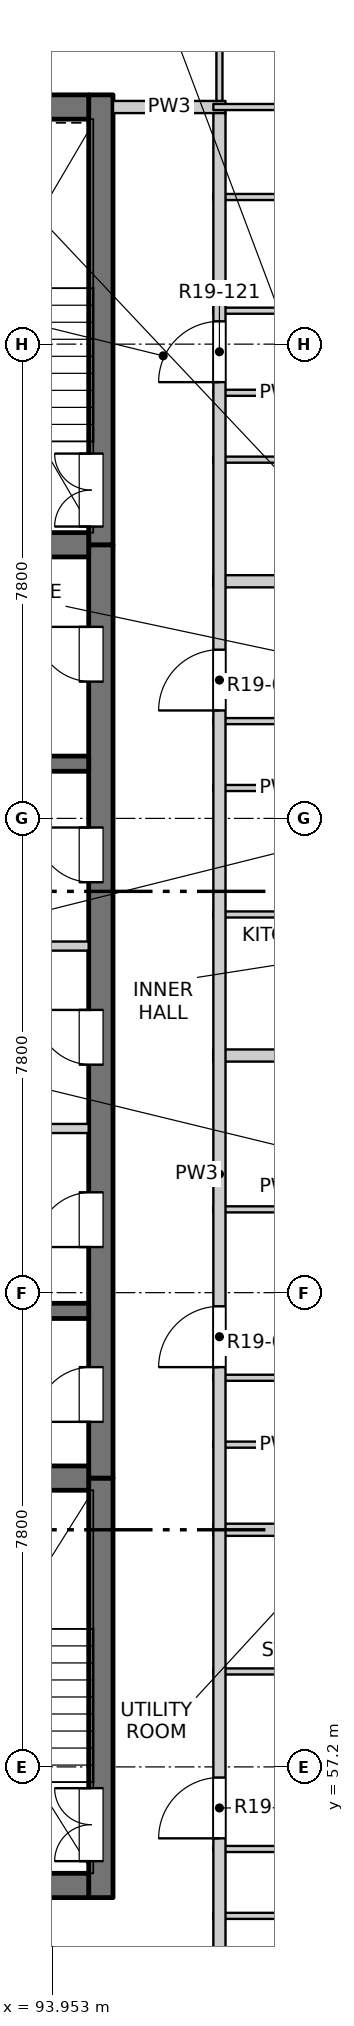
"""IFC4 building model, lengths in metres.
Left out: names, types, materials, properties, quantities, classifications, styles, units other than length and angle.
Written with IfcOpenShell. Run it as: python <this file> out.ifc"""

import sys

from ifc_helpers import new_model, si_unit, direction, frame, frame_2d, origin, place, context, subcontext, project, spatial, rectangle, extrude, element, fill, save


model = new_model("IFC4")
c1 = context("Model", 3, precision=1e-05, world=origin(), true_north=direction((0.0, 1.0)))
c2 = subcontext(c1, "Body", "Model", "MODEL_VIEW")
j1 = project(units=[si_unit("LENGTHUNIT", "METRE"), si_unit("PLANEANGLEUNIT", "RADIAN")], contexts=[c1])
p1 = place(None, origin())
s1 = spatial("IfcSite", under=j1, at=p1, CompositionType="ELEMENT")
p2 = place(p1, origin())
s2 = spatial("IfcBuilding", under=s1, at=p2, CompositionType="ELEMENT")
p3 = place(p2, frame((0.0, 0.0, 197.3)))
s3 = spatial("IfcBuildingStorey", under=s2, at=p3, CompositionType="ELEMENT", Elevation=197.3)
p4 = place(p3, frame((94.75, 55.05, -0.3), z_axis=(0.0, 0.0, 1.0), x_axis=(0.0, 1.0, 0.0)))
e1 = element("IfcWall", 1, at=p4, inside=s3, PredefinedType="SOLIDWALL", context=c2, shape_type="SweptSolid", body=[
    extrude(rectangle(XDim=6.9, YDim=0.4, at=frame_2d((3.45, 0.0))), origin(), (0.0, 0.0, 1.0), 3.45),
])
p5 = place(p4, frame((0.6, 0.0, 0.3)))
e2 = element("IfcOpeningElement", 2, at=p5, cuts=e1, PredefinedType="OPENING", context=c2, shape_type="SweptSolid", body=[
    extrude(rectangle(XDim=1.2, YDim=2.1, at=frame_2d((0.6, 1.05))), frame((0.0, 0.21, 0.0), z_axis=(0.0, -1.0, 0.0), x_axis=(1.0, 0.0, 0.0)), (0.0, 0.0, 1.0), 0.42),
])
p6 = place(p3, frame((94.75, 61.95, -0.3), z_axis=(0.0, 0.0, 1.0), x_axis=(0.0, 1.0, 0.0)))
e3 = element("IfcWall", 3, at=p6, inside=s3, PredefinedType="SOLIDWALL", context=c2, shape_type="SweptSolid", body=[
    extrude(rectangle(XDim=15.35, YDim=0.4, at=frame_2d((7.675, 0.0))), origin(), (0.0, 0.0, 1.0), 3.45),
])
p7 = place(p6, frame((0.925, 0.0, 0.3)))
e4 = element("IfcOpeningElement", 4, at=p7, cuts=e3, PredefinedType="OPENING", context=c2, shape_type="SweptSolid", body=[
    extrude(rectangle(XDim=0.9, YDim=2.1, at=frame_2d((0.45, 1.05))), frame((0.0, 0.21, 0.0), z_axis=(0.0, -1.0, 0.0), x_axis=(1.0, 0.0, 0.0)), (0.0, 0.0, 1.0), 0.42),
])
p8 = place(p6, frame((3.8, 0.0, 0.3)))
e5 = element("IfcOpeningElement", 5, at=p8, cuts=e3, PredefinedType="OPENING", context=c2, shape_type="SweptSolid", body=[
    extrude(rectangle(XDim=0.9, YDim=2.1, at=frame_2d((0.45, 1.05))), frame((0.0, 0.21, 0.0), z_axis=(0.0, -1.0, 0.0), x_axis=(1.0, 0.0, 0.0)), (0.0, 0.0, 1.0), 0.42),
])
p9 = place(p6, frame((6.8, 0.0, 0.3)))
e6 = element("IfcOpeningElement", 6, at=p9, cuts=e3, PredefinedType="OPENING", context=c2, shape_type="SweptSolid", body=[
    extrude(rectangle(XDim=0.9, YDim=2.1, at=frame_2d((0.45, 1.05))), frame((0.0, 0.21, 0.0), z_axis=(0.0, -1.0, 0.0), x_axis=(1.0, 0.0, 0.0)), (0.0, 0.0, 1.0), 0.42),
])
p10 = place(p6, frame((9.8, 0.0, 0.3)))
e7 = element("IfcOpeningElement", 7, at=p10, cuts=e3, PredefinedType="OPENING", context=c2, shape_type="SweptSolid", body=[
    extrude(rectangle(XDim=0.9, YDim=2.1, at=frame_2d((0.45, 1.05))), frame((0.0, 0.21, 0.0), z_axis=(0.0, -1.0, 0.0), x_axis=(1.0, 0.0, 0.0)), (0.0, 0.0, 1.0), 0.42),
])
p11 = place(p6, frame((13.1, 0.0, 0.3)))
e8 = element("IfcOpeningElement", 8, at=p11, cuts=e3, PredefinedType="OPENING", context=c2, shape_type="SweptSolid", body=[
    extrude(rectangle(XDim=0.9, YDim=2.1, at=frame_2d((0.45, 1.05))), frame((0.0, 0.21, 0.0), z_axis=(0.0, -1.0, 0.0), x_axis=(1.0, 0.0, 0.0)), (0.0, 0.0, 1.0), 0.42),
])
p12 = place(p3, frame((94.75, 77.3, -0.3), z_axis=(0.0, 0.0, 1.0), x_axis=(0.0, 1.0, 0.0)))
e9 = element("IfcWall", 9, at=p12, inside=s3, PredefinedType="SOLIDWALL", context=c2, shape_type="SweptSolid", body=[
    extrude(rectangle(XDim=7.4, YDim=0.4, at=frame_2d((3.7, 0.0))), origin(), (0.0, 0.0, 1.0), 3.45),
])
p13 = place(p12, frame((0.3, 0.0, 0.3)))
e10 = element("IfcOpeningElement", 10, at=p13, cuts=e9, PredefinedType="OPENING", context=c2, shape_type="SweptSolid", body=[
    extrude(rectangle(XDim=1.2, YDim=2.1, at=frame_2d((0.6, 1.05))), frame((0.0, 0.21, 0.0), z_axis=(0.0, -1.0, 0.0), x_axis=(1.0, 0.0, 0.0)), (0.0, 0.0, 1.0), 0.42),
])
p14 = place(p3, frame((75.45, 55.25, -0.3), z_axis=(0.0, 0.0, 1.0), x_axis=(1.0, 0.0, 0.0)))
e11 = element("IfcWall", 11, at=p14, inside=s3, PredefinedType="SOLIDWALL", context=c2, shape_type="SweptSolid", body=[
    extrude(rectangle(XDim=19.1, YDim=0.4, at=frame_2d((9.55, 0.0))), origin(), (0.0, 0.0, 1.0), 3.45),
])
p15 = place(p14, frame((8.8, 0.0, 0.3)))
e12 = element("IfcOpeningElement", 12, at=p15, cuts=e11, PredefinedType="OPENING", context=c2, shape_type="SweptSolid", body=[
    extrude(rectangle(XDim=1.5, YDim=2.1, at=frame_2d((0.75, 1.05))), frame((0.0, 0.21, 0.0), z_axis=(0.0, -1.0, 0.0), x_axis=(1.0, 0.0, 0.0)), (0.0, 0.0, 1.0), 0.42),
])
p16 = place(p3, frame((75.45, 84.5, -0.3), z_axis=(0.0, 0.0, 1.0), x_axis=(1.0, 0.0, 0.0)))
e13 = element("IfcWall", 13, at=p16, inside=s3, PredefinedType="SOLIDWALL", context=c2, shape_type="SweptSolid", body=[
    extrude(rectangle(XDim=19.1, YDim=0.4, at=frame_2d((9.55, 0.0))), origin(), (0.0, 0.0, 1.0), 3.45),
])
p17 = place(p3, frame((90.675, 61.95, -0.3), z_axis=(0.0, 0.0, 1.0), x_axis=(1.0, 0.0, 0.0)))
e14 = element("IfcWall", 14, at=p17, inside=s3, PredefinedType="SOLIDWALL", context=c2, shape_type="SweptSolid", body=[
    extrude(rectangle(XDim=3.875, YDim=0.4, at=frame_2d((1.938, 0.0))), origin(), (0.0, 0.0, 1.0), 3.45),
])
for number, where, z_axis, x_axis in (
    (15, (90.675, 64.7, -0.3), (0.0, 0.0, 1.0), (1.0, 0.0, 0.0)),
    (16, (90.675, 73.7, -0.3), (0.0, 0.0, 1.0), (1.0, 0.0, 0.0)),
):
    element("IfcWall", number, at=place(p3, frame(where, z_axis=z_axis, x_axis=x_axis)), inside=s3, PredefinedType="SOLIDWALL", context=c2, shape_type="SweptSolid", body=[
        extrude(rectangle(XDim=3.875, YDim=0.25, at=frame_2d((1.938, 0.0))), origin(), (0.0, 0.0, 1.0), 3.45),
    ])
p18 = place(p3, frame((90.675, 77.3, -0.3), z_axis=(0.0, 0.0, 1.0), x_axis=(1.0, 0.0, 0.0)))
e17 = element("IfcWall", 17, at=p18, inside=s3, PredefinedType="SOLIDWALL", context=c2, shape_type="SweptSolid", body=[
    extrude(rectangle(XDim=3.875, YDim=0.4, at=frame_2d((1.938, 0.0))), origin(), (0.0, 0.0, 1.0), 3.45),
])
for number, where, z_axis, x_axis in (
    (18, (96.6, 54.75, 0.0), (0.0, 0.0, 1.0), (1.0, 0.0, 0.0)),
    (19, (96.6, 55.85, 0.0), (0.0, 0.0, 1.0), (1.0, 0.0, 0.0)),
    (20, (96.6, 58.77, 0.0), (0.0, 0.0, 1.0), (1.0, 0.0, 0.0)),
):
    element("IfcWall", number, at=place(p3, frame(where, z_axis=z_axis, x_axis=x_axis)), inside=s3, PredefinedType="PARTITIONING", context=c2, shape_type="SweptSolid", body=[
        extrude(rectangle(XDim=2.22, YDim=0.1, at=frame_2d((1.11, 0.0))), origin(), (0.0, 0.0, 1.0), 3.15),
    ])
p19 = place(p3, frame((96.6, 61.1, 0.0), z_axis=(0.0, 0.0, 1.0), x_axis=(1.0, 0.0, 0.0)))
e21 = element("IfcWall", 21, at=p19, inside=s3, PredefinedType="PARTITIONING", context=c2, shape_type="SweptSolid", body=[
    extrude(rectangle(XDim=11.5, YDim=0.2, at=frame_2d((5.75, 0.0))), origin(), (0.0, 0.0, 1.0), 2.55),
])
for number, where, z_axis, x_axis in (
    (22, (96.6, 62.5, 0.0), (0.0, 0.0, 1.0), (1.0, 0.0, 0.0)),
    (23, (96.6, 63.6, 0.0), (0.0, 0.0, 1.0), (1.0, 0.0, 0.0)),
    (24, (96.6, 66.37, 0.0), (0.0, 0.0, 1.0), (1.0, 0.0, 0.0)),
):
    element("IfcWall", number, at=place(p3, frame(where, z_axis=z_axis, x_axis=x_axis)), inside=s3, PredefinedType="PARTITIONING", context=c2, shape_type="SweptSolid", body=[
        extrude(rectangle(XDim=2.22, YDim=0.1, at=frame_2d((1.11, 0.0))), origin(), (0.0, 0.0, 1.0), 3.15),
    ])
p20 = place(p3, frame((90.675, 67.7, 0.0), z_axis=(0.0, 0.0, 1.0), x_axis=(1.0, 0.0, 0.0)))
e25 = element("IfcWall", 25, at=p20, inside=s3, PredefinedType="PARTITIONING", context=c2, shape_type="SweptSolid", body=[
    extrude(rectangle(XDim=3.875, YDim=0.15, at=frame_2d((1.938, 0.0))), origin(), (0.0, 0.0, 1.0), 3.15),
])
p21 = place(p3, frame((96.6, 68.9, 0.0), z_axis=(0.0, 0.0, 1.0), x_axis=(1.0, 0.0, 0.0)))
e26 = element("IfcWall", 26, at=p21, inside=s3, PredefinedType="PARTITIONING", context=c2, shape_type="SweptSolid", body=[
    extrude(rectangle(XDim=11.5, YDim=0.2, at=frame_2d((5.75, 0.0))), origin(), (0.0, 0.0, 1.0), 2.55),
])
p22 = place(p3, frame((90.675, 70.7, 0.0), z_axis=(0.0, 0.0, 1.0), x_axis=(1.0, 0.0, 0.0)))
e27 = element("IfcWall", 27, at=p22, inside=s3, PredefinedType="PARTITIONING", context=c2, shape_type="SweptSolid", body=[
    extrude(rectangle(XDim=3.875, YDim=0.15, at=frame_2d((1.938, 0.0))), origin(), (0.0, 0.0, 1.0), 3.15),
])
for number, where, z_axis, x_axis in (
    (28, (96.6, 71.22, 0.0), (0.0, 0.0, 1.0), (1.0, 0.0, 0.0)),
    (29, (96.6, 73.3, 0.0), (0.0, 0.0, 1.0), (1.0, 0.0, 0.0)),
    (30, (96.6, 74.4, 0.0), (0.0, 0.0, 1.0), (1.0, 0.0, 0.0)),
):
    element("IfcWall", number, at=place(p3, frame(where, z_axis=z_axis, x_axis=x_axis)), inside=s3, PredefinedType="PARTITIONING", context=c2, shape_type="SweptSolid", body=[
        extrude(rectangle(XDim=2.22, YDim=0.1, at=frame_2d((1.11, 0.0))), origin(), (0.0, 0.0, 1.0), 3.15),
    ])
p23 = place(p3, frame((96.6, 76.7, 0.0), z_axis=(0.0, 0.0, 1.0), x_axis=(1.0, 0.0, 0.0)))
e31 = element("IfcWall", 31, at=p23, inside=s3, PredefinedType="PARTITIONING", context=c2, shape_type="SweptSolid", body=[
    extrude(rectangle(XDim=11.5, YDim=0.2, at=frame_2d((5.75, 0.0))), origin(), (0.0, 0.0, 1.0), 2.55),
])
for number, where, z_axis, x_axis in (
    (32, (96.6, 78.7, 0.0), (0.0, 0.0, 1.0), (1.0, 0.0, 0.0)),
    (33, (96.6, 79.8, 0.0), (0.0, 0.0, 1.0), (1.0, 0.0, 0.0)),
    (34, (96.6, 81.15, 0.0), (0.0, 0.0, 1.0), (1.0, 0.0, 0.0)),
    (35, (96.6, 83.02, 0.0), (0.0, 0.0, 1.0), (1.0, 0.0, 0.0)),
):
    element("IfcWall", number, at=place(p3, frame(where, z_axis=z_axis, x_axis=x_axis)), inside=s3, PredefinedType="PARTITIONING", context=c2, shape_type="SweptSolid", body=[
        extrude(rectangle(XDim=2.22, YDim=0.1, at=frame_2d((1.11, 0.0))), origin(), (0.0, 0.0, 1.0), 3.15),
    ])
p24 = place(p3, frame((94.95, 84.5, 0.0), z_axis=(0.0, 0.0, 1.0), x_axis=(1.0, 0.0, 0.0)))
e36 = element("IfcWall", 36, at=p24, inside=s3, PredefinedType="PARTITIONING", context=c2, shape_type="SweptSolid", body=[
    extrude(rectangle(XDim=1.85, YDim=0.2, at=frame_2d((0.925, 0.0))), origin(), (0.0, 0.0, 1.0), 3.15),
])
p25 = place(p3, frame((96.6, 84.5, 0.0), z_axis=(0.0, 0.0, 1.0), x_axis=(1.0, 0.0, 0.0)))
e37 = element("IfcWall", 37, at=p25, inside=s3, PredefinedType="PARTITIONING", context=c2, shape_type="SweptSolid", body=[
    extrude(rectangle(XDim=11.5, YDim=0.1, at=frame_2d((5.75, 0.0))), origin(), (0.0, 0.0, 1.0), 3.15),
])
p26 = place(p25, frame((2.635, 0.0, 0.0)))
e38 = element("IfcOpeningElement", 38, at=p26, cuts=e37, PredefinedType="OPENING", context=c2, shape_type="SweptSolid", body=[
    extrude(rectangle(XDim=0.9, YDim=2.1, at=frame_2d((0.45, 1.05))), frame((0.0, 0.06, 0.0), z_axis=(0.0, -1.0, 0.0), x_axis=(1.0, 0.0, 0.0)), (0.0, 0.0, 1.0), 0.12),
])
p27 = place(p3, frame((96.7, 49.5, 0.0), z_axis=(0.0, 0.0, 1.0), x_axis=(0.0, 1.0, 0.0)))
e39 = element("IfcWall", 39, at=p27, inside=s3, PredefinedType="PARTITIONING", context=c2, shape_type="SweptSolid", body=[
    extrude(rectangle(XDim=34.9, YDim=0.2, at=frame_2d((17.45, 0.0))), origin(), (0.0, 0.0, 1.0), 3.15),
])
p28 = place(p27, frame((6.525, 0.0, 0.0)))
e40 = element("IfcOpeningElement", 40, at=p28, cuts=e39, PredefinedType="OPENING", context=c2, shape_type="SweptSolid", body=[
    extrude(rectangle(XDim=1.0, YDim=2.1, at=frame_2d((0.5, 1.05))), frame((0.0, 0.11, 0.0), z_axis=(0.0, -1.0, 0.0), x_axis=(1.0, 0.0, 0.0)), (0.0, 0.0, 1.0), 0.22),
])
p29 = place(p27, frame((14.275, 0.0, 0.0)))
e41 = element("IfcOpeningElement", 41, at=p29, cuts=e39, PredefinedType="OPENING", context=c2, shape_type="SweptSolid", body=[
    extrude(rectangle(XDim=1.0, YDim=2.1, at=frame_2d((0.5, 1.05))), frame((0.0, 0.11, 0.0), z_axis=(0.0, -1.0, 0.0), x_axis=(1.0, 0.0, 0.0)), (0.0, 0.0, 1.0), 0.22),
])
p30 = place(p27, frame((25.075, 0.0, 0.0)))
e42 = element("IfcOpeningElement", 42, at=p30, cuts=e39, PredefinedType="OPENING", context=c2, shape_type="SweptSolid", body=[
    extrude(rectangle(XDim=1.0, YDim=2.1, at=frame_2d((0.5, 1.05))), frame((0.0, 0.11, 0.0), z_axis=(0.0, -1.0, 0.0), x_axis=(1.0, 0.0, 0.0)), (0.0, 0.0, 1.0), 0.22),
])
p31 = place(p27, frame((30.475, 0.0, 0.0)))
e43 = element("IfcOpeningElement", 43, at=p31, cuts=e39, PredefinedType="OPENING", context=c2, shape_type="SweptSolid", body=[
    extrude(rectangle(XDim=1.0, YDim=2.1, at=frame_2d((0.5, 1.05))), frame((0.0, 0.11, 0.0), z_axis=(0.0, -1.0, 0.0), x_axis=(1.0, 0.0, 0.0)), (0.0, 0.0, 1.0), 0.22),
])
p32 = place(p3, frame((96.7, 84.6, 0.0), z_axis=(0.0, 0.0, 1.0), x_axis=(0.0, 1.0, 0.0)))
e44 = element("IfcWall", 44, at=p32, inside=s3, PredefinedType="PARTITIONING", context=c2, shape_type="SweptSolid", body=[
    extrude(rectangle(XDim=3.5, YDim=0.1, at=frame_2d((1.75, 0.0))), origin(), (0.0, 0.0, 1.0), 3.15),
])
p33 = place(p32, frame((1.4, 0.0, 0.0)))
e45 = element("IfcOpeningElement", 45, at=p33, cuts=e44, PredefinedType="OPENING", context=c2, shape_type="SweptSolid", body=[
    extrude(rectangle(XDim=0.9, YDim=2.1, at=frame_2d((0.45, 1.05))), frame((0.0, 0.06, 0.0), z_axis=(0.0, -1.0, 0.0), x_axis=(1.0, 0.0, 0.0)), (0.0, 0.0, 1.0), 0.12),
])
p34 = place(p5, origin())
e46 = element("IfcDoor", 46, at=p34, inside=s3, OperationType="DOUBLE_DOOR_SINGLE_SWING", PredefinedType="DOOR", context=c2, shape_type="SweptSolid", body=[
    extrude(rectangle(XDim=1.2, YDim=2.1, at=frame_2d((0.6, 1.05))), frame((0.0, 0.185, 0.0), z_axis=(0.0, -1.0, 0.0), x_axis=(1.0, 0.0, 0.0)), (0.0, 0.0, 1.0), 0.05),
])
fill(e2, e46)
p35 = place(p28, origin())
e47 = element("IfcDoor", 47, at=p35, inside=s3, OperationType="SINGLE_SWING_LEFT", PredefinedType="DOOR", context=c2, shape_type="SweptSolid", body=[
    extrude(rectangle(XDim=1.0, YDim=2.1, at=frame_2d((0.5, 1.05))), frame((0.0, 0.025, 0.0), z_axis=(0.0, -1.0, 0.0), x_axis=(1.0, 0.0, 0.0)), (0.0, 0.0, 1.0), 0.05),
])
fill(e40, e47)
p36 = place(p7, origin())
e48 = element("IfcDoor", 48, at=p36, inside=s3, OperationType="SINGLE_SWING_LEFT", PredefinedType="DOOR", context=c2, shape_type="SweptSolid", body=[
    extrude(rectangle(XDim=0.9, YDim=2.1, at=frame_2d((0.45, 1.05))), frame((0.0, 0.185, 0.0), z_axis=(0.0, -1.0, 0.0), x_axis=(1.0, 0.0, 0.0)), (0.0, 0.0, 1.0), 0.05),
])
fill(e4, e48)
p37 = place(p29, origin())
e49 = element("IfcDoor", 49, at=p37, inside=s3, OperationType="SINGLE_SWING_LEFT", PredefinedType="DOOR", context=c2, shape_type="SweptSolid", body=[
    extrude(rectangle(XDim=1.0, YDim=2.1, at=frame_2d((0.5, 1.05))), frame((0.0, 0.025, 0.0), z_axis=(0.0, -1.0, 0.0), x_axis=(1.0, 0.0, 0.0)), (0.0, 0.0, 1.0), 0.05),
])
fill(e41, e49)
p38 = place(p8, origin())
e50 = element("IfcDoor", 50, at=p38, inside=s3, OperationType="SINGLE_SWING_LEFT", PredefinedType="DOOR", context=c2, shape_type="SweptSolid", body=[
    extrude(rectangle(XDim=0.9, YDim=2.1, at=frame_2d((0.45, 1.05))), frame((0.0, 0.185, 0.0), z_axis=(0.0, -1.0, 0.0), x_axis=(1.0, 0.0, 0.0)), (0.0, 0.0, 1.0), 0.05),
])
fill(e5, e50)
p39 = place(p9, origin())
e51 = element("IfcDoor", 51, at=p39, inside=s3, OperationType="SINGLE_SWING_RIGHT", PredefinedType="DOOR", context=c2, shape_type="SweptSolid", body=[
    extrude(rectangle(XDim=0.9, YDim=2.1, at=frame_2d((0.45, 1.05))), frame((0.0, 0.185, 0.0), z_axis=(0.0, -1.0, 0.0), x_axis=(1.0, 0.0, 0.0)), (0.0, 0.0, 1.0), 0.05),
])
fill(e6, e51)
p40 = place(p10, origin())
e52 = element("IfcDoor", 52, at=p40, inside=s3, OperationType="SINGLE_SWING_RIGHT", PredefinedType="DOOR", context=c2, shape_type="SweptSolid", body=[
    extrude(rectangle(XDim=0.9, YDim=2.1, at=frame_2d((0.45, 1.05))), frame((0.0, 0.185, 0.0), z_axis=(0.0, -1.0, 0.0), x_axis=(1.0, 0.0, 0.0)), (0.0, 0.0, 1.0), 0.05),
])
fill(e7, e52)
p41 = place(p30, origin())
e53 = element("IfcDoor", 53, at=p41, inside=s3, OperationType="SINGLE_SWING_LEFT", PredefinedType="DOOR", context=c2, shape_type="SweptSolid", body=[
    extrude(rectangle(XDim=1.0, YDim=2.1, at=frame_2d((0.5, 1.05))), frame((0.0, 0.025, 0.0), z_axis=(0.0, -1.0, 0.0), x_axis=(1.0, 0.0, 0.0)), (0.0, 0.0, 1.0), 0.05),
])
fill(e42, e53)
p42 = place(p11, origin())
e54 = element("IfcDoor", 54, at=p42, inside=s3, OperationType="SINGLE_SWING_RIGHT", PredefinedType="DOOR", context=c2, shape_type="SweptSolid", body=[
    extrude(rectangle(XDim=0.9, YDim=2.1, at=frame_2d((0.45, 1.05))), frame((0.0, 0.185, 0.0), z_axis=(0.0, -1.0, 0.0), x_axis=(1.0, 0.0, 0.0)), (0.0, 0.0, 1.0), 0.05),
])
fill(e8, e54)
p43 = place(p13, origin())
e55 = element("IfcDoor", 55, at=p43, inside=s3, OperationType="DOUBLE_DOOR_SINGLE_SWING", PredefinedType="DOOR", context=c2, shape_type="SweptSolid", body=[
    extrude(rectangle(XDim=1.2, YDim=2.1, at=frame_2d((0.6, 1.05))), frame((0.0, 0.185, 0.0), z_axis=(0.0, -1.0, 0.0), x_axis=(1.0, 0.0, 0.0)), (0.0, 0.0, 1.0), 0.05),
])
fill(e10, e55)
p44 = place(p31, origin())
e56 = element("IfcDoor", 56, at=p44, inside=s3, OperationType="SINGLE_SWING_LEFT", PredefinedType="DOOR", context=c2, shape_type="SweptSolid", body=[
    extrude(rectangle(XDim=1.0, YDim=2.1, at=frame_2d((0.5, 1.05))), frame((0.0, 0.025, 0.0), z_axis=(0.0, -1.0, 0.0), x_axis=(1.0, 0.0, 0.0)), (0.0, 0.0, 1.0), 0.05),
])
fill(e43, e56)
save(model, sys.argv[1])
